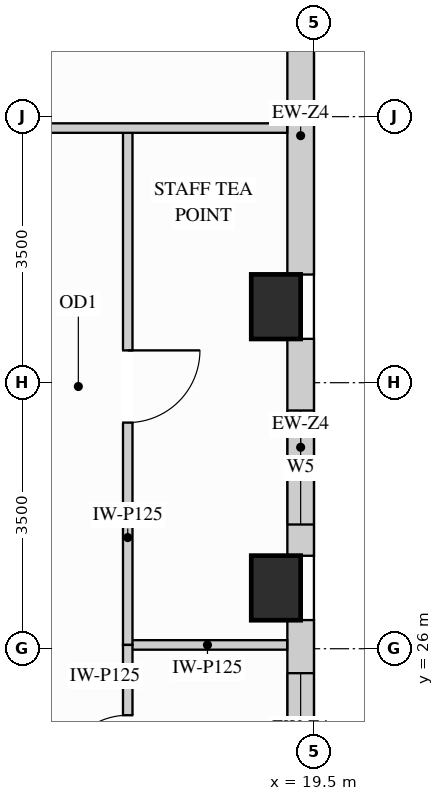
"""IFC4 building model, lengths in metres.
Left out: names, types, materials, properties, quantities, classifications, styles, units other than length and angle.
Written with IfcOpenShell. Run it as: python <this file> out.ifc"""

import sys

from ifc_helpers import new_model, si_unit, direction, frame, frame_2d, origin, origin_2d, place, context, subcontext, project, spatial, rectangle, extrude, source, transform, mapped, element, fill, save


model = new_model("IFC4")
c1 = context("Model", 3, precision=1e-05, world=origin(), true_north=direction((0.0, 1.0)))
c2 = subcontext(c1, "Body", "Model", "MODEL_VIEW")
j1 = project(units=[si_unit("LENGTHUNIT", "METRE"), si_unit("PLANEANGLEUNIT", "RADIAN")], contexts=[c1])
p1 = place(None, origin())
s1 = spatial("IfcSite", under=j1, at=p1, CompositionType="ELEMENT")
p2 = place(p1, origin())
s2 = spatial("IfcBuilding", under=s1, at=p2, CompositionType="ELEMENT")
p3 = place(p2, frame((0.0, 0.0, 252.0)))
s3 = spatial("IfcBuildingStorey", under=s2, at=p3, CompositionType="ELEMENT", Elevation=252.0)
m1 = source(origin(), c2, "Body", "SweptSolid", [
    extrude(rectangle(XDim=0.65, YDim=0.85, at=origin_2d()), origin(), (0.0, 0.0, 1.0), 3.4),
])
for number, where, z_axis, x_axis in (
    (1, (19.0, 26.8, 0.0), (0.0, 0.0, 1.0), (1.0, 0.0, 0.0)),
    (2, (19.0, 30.5, 0.0), (0.0, 0.0, 1.0), (1.0, 0.0, 0.0)),
):
    element("IfcColumn", number, at=place(p3, frame(where, z_axis=z_axis, x_axis=x_axis)), inside=s3, PredefinedType="COLUMN", context=c2, shape_type="MappedRepresentation", body=[
        mapped(m1, transform((0.0, 0.0, 0.0), x_axis=(1.0, 0.0, 0.0), y_axis=(0.0, 1.0, 0.0), z_axis=(0.0, 0.0, 1.0))),
    ])
p4 = place(p3, frame((19.325, 22.923, 0.0), z_axis=(0.0, 0.0, 1.0), x_axis=(0.0, 1.0, 0.0)))
e3 = element("IfcWall", 3, at=p4, inside=s3, PredefinedType="SOLIDWALL", context=c2, shape_type="SweptSolid", body=[
    extrude(rectangle(XDim=3.454, YDim=0.35, at=frame_2d((1.727, 0.0))), origin(), (0.0, 0.0, 1.0), 2.619),
])
p5 = place(p4, frame((1.256, 0.0, 0.78)))
e4 = element("IfcOpeningElement", 4, at=p5, cuts=e3, PredefinedType="OPENING", context=c2, shape_type="SweptSolid", body=[
    extrude(rectangle(XDim=1.5, YDim=1.659, at=frame_2d((0.75, 0.83))), frame((0.0, 0.185, 0.0), z_axis=(0.0, -1.0, 0.0), x_axis=(1.0, 0.0, 0.0)), (0.0, 0.0, 1.0), 0.37),
])
p6 = place(p3, frame((19.325, 27.223, 0.0), z_axis=(0.0, 0.0, 1.0), x_axis=(0.0, 1.0, 0.0)))
e5 = element("IfcWall", 5, at=p6, inside=s3, PredefinedType="SOLIDWALL", context=c2, shape_type="SweptSolid", body=[
    extrude(rectangle(XDim=2.854, YDim=0.35, at=frame_2d((1.427, 0.0))), origin(), (0.0, 0.0, 1.0), 2.619),
])
p7 = place(p6, frame((0.411, 0.0, 0.78)))
e6 = element("IfcOpeningElement", 6, at=p7, cuts=e5, PredefinedType="OPENING", context=c2, shape_type="SweptSolid", body=[
    extrude(rectangle(XDim=1.5, YDim=1.659, at=frame_2d((0.75, 0.83))), frame((0.0, 0.185, 0.0), z_axis=(0.0, -1.0, 0.0), x_axis=(1.0, 0.0, 0.0)), (0.0, 0.0, 1.0), 0.37),
])
m2 = source(origin(), c2, "Body", "SweptSolid", [
    extrude(rectangle(XDim=3.654, YDim=0.35, at=frame_2d((1.827, 0.0))), origin(), (0.0, 0.0, 1.0), 2.619),
])
p8 = place(p3, frame((19.325, 30.923, 0.0), z_axis=(0.0, 0.0, 1.0), x_axis=(0.0, 1.0, 0.0)))
e7 = element("IfcWall", 7, at=p8, inside=s3, PredefinedType="SOLIDWALL", context=c2, shape_type="MappedRepresentation", body=[
    mapped(m2, transform((0.0, 0.0, 0.0), x_axis=(1.0, 0.0, 0.0), y_axis=(0.0, 1.0, 0.0), z_axis=(0.0, 0.0, 1.0))),
])
m3 = source(origin(), c2, "Body", "SweptSolid", [
    extrude(rectangle(XDim=2.098, YDim=0.125, at=frame_2d((1.049, 0.0))), origin(), (0.0, 0.0, 1.0), 3.385),
])
p9 = place(p3, frame((17.05, 26.05, 0.0), z_axis=(0.0, 0.0, 1.0), x_axis=(1.0, 0.0, 0.0)))
e8 = element("IfcWall", 8, at=p9, inside=s3, PredefinedType="PARTITIONING", context=c2, shape_type="MappedRepresentation", body=[
    mapped(m3, transform((0.0, 0.0, 0.0), x_axis=(1.0, 0.0, 0.0), y_axis=(0.0, 1.0, 0.0), z_axis=(0.0, 0.0, 1.0))),
])
p10 = place(p3, frame((17.05, 26.05, 0.0), z_axis=(0.0, 0.0, 1.0), x_axis=(0.0, 1.0, 0.0)))
e9 = element("IfcWall", 9, at=p10, inside=s3, PredefinedType="PARTITIONING", context=c2, shape_type="SweptSolid", body=[
    extrude(rectangle(XDim=6.8, YDim=0.125, at=frame_2d((3.4, 0.0))), origin(), (0.0, 0.0, 1.0), 3.385),
])
p11 = place(p10, frame((2.925, 0.0, 0.0)))
e10 = element("IfcOpeningElement", 10, at=p11, cuts=e9, PredefinedType="OPENING", context=c2, shape_type="SweptSolid", body=[
    extrude(rectangle(XDim=0.95, YDim=2.15, at=frame_2d((0.475, 1.075))), frame((0.0, 0.073, 0.0), z_axis=(0.0, -1.0, 0.0), x_axis=(1.0, 0.0, 0.0)), (0.0, 0.0, 1.0), 0.145),
])
p12 = place(p3, frame((17.05, 23.35, 0.0), z_axis=(0.0, 0.0, 1.0), x_axis=(0.0, 1.0, 0.0)))
e11 = element("IfcWall", 11, at=p12, inside=s3, PredefinedType="PARTITIONING", context=c2, shape_type="SweptSolid", body=[
    extrude(rectangle(XDim=2.7, YDim=0.125, at=frame_2d((1.35, 0.0))), origin(), (0.0, 0.0, 1.0), 3.385),
])
p13 = place(p12, frame((0.875, 0.0, 0.0)))
e12 = element("IfcOpeningElement", 12, at=p13, cuts=e11, PredefinedType="OPENING", context=c2, shape_type="SweptSolid", body=[
    extrude(rectangle(XDim=0.9, YDim=2.15, at=frame_2d((0.45, 1.075))), frame((0.0, 0.073, 0.0), z_axis=(0.0, -1.0, 0.0), x_axis=(1.0, 0.0, 0.0)), (0.0, 0.0, 1.0), 0.145),
])
m4 = source(origin(), c2, "Body", "SweptSolid", [
    extrude(rectangle(XDim=12.598, YDim=0.125, at=frame_2d((6.299, 0.0))), origin(), (0.0, 0.0, 1.0), 3.385),
])
p14 = place(p3, frame((6.55, 32.85, 0.0), z_axis=(0.0, 0.0, 1.0), x_axis=(1.0, 0.0, 0.0)))
e13 = element("IfcWall", 13, at=p14, inside=s3, PredefinedType="PARTITIONING", context=c2, shape_type="MappedRepresentation", body=[
    mapped(m4, transform((0.0, 0.0, 0.0), x_axis=(1.0, 0.0, 0.0), y_axis=(0.0, 1.0, 0.0), z_axis=(0.0, 0.0, 1.0))),
])
m5 = source(origin(), c2, "Body", "SweptSolid", [
    extrude(rectangle(XDim=0.95, YDim=2.15, at=frame_2d((0.475, 1.075))), frame((0.0, 0.025, 0.0), z_axis=(0.0, -1.0, 0.0), x_axis=(1.0, 0.0, 0.0)), (0.0, 0.0, 1.0), 0.05),
])
p15 = place(p11, origin())
e14 = element("IfcDoor", 14, at=p15, inside=s3, OperationType="SINGLE_SWING_RIGHT", PredefinedType="DOOR", context=c2, shape_type="MappedRepresentation", body=[
    mapped(m5, transform((0.0, 0.0, 0.0), x_axis=(1.0, 0.0, 0.0), y_axis=(0.0, 1.0, 0.0), z_axis=(0.0, 0.0, 1.0))),
])
fill(e10, e14)
m6 = source(origin(), c2, "Body", "SweptSolid", [
    extrude(rectangle(XDim=0.9, YDim=2.15, at=frame_2d((0.45, 1.075))), frame((0.0, 0.025, 0.0), z_axis=(0.0, -1.0, 0.0), x_axis=(1.0, 0.0, 0.0)), (0.0, 0.0, 1.0), 0.05),
])
p16 = place(p13, origin())
e15 = element("IfcDoor", 15, at=p16, inside=s3, OperationType="SINGLE_SWING_LEFT", PredefinedType="DOOR", context=c2, shape_type="MappedRepresentation", body=[
    mapped(m6, transform((0.0, 0.0, 0.0), x_axis=(1.0, 0.0, 0.0), y_axis=(0.0, 1.0, 0.0), z_axis=(0.0, 0.0, 1.0))),
])
fill(e12, e15)
m7 = source(origin(), c2, "Body", "SweptSolid", [
    extrude(rectangle(XDim=1.5, YDim=1.659, at=frame_2d((0.75, 0.83))), frame((0.0, 0.03, 0.0), z_axis=(0.0, -1.0, 0.0), x_axis=(1.0, 0.0, 0.0)), (0.0, 0.0, 1.0), 0.06),
])
p17 = place(p5, origin())
e16 = element("IfcWindow", 16, at=p17, inside=s3, PartitioningType="SINGLE_PANEL", PredefinedType="WINDOW", context=c2, shape_type="MappedRepresentation", body=[
    mapped(m7, transform((0.0, 0.0, 0.0), x_axis=(1.0, 0.0, 0.0), y_axis=(0.0, 1.0, 0.0), z_axis=(0.0, 0.0, 1.0))),
])
fill(e4, e16)
p18 = place(p7, origin())
e17 = element("IfcWindow", 17, at=p18, inside=s3, PartitioningType="SINGLE_PANEL", PredefinedType="WINDOW", context=c2, shape_type="MappedRepresentation", body=[
    mapped(m7, transform((0.0, 0.0, 0.0), x_axis=(1.0, 0.0, 0.0), y_axis=(0.0, 1.0, 0.0), z_axis=(0.0, 0.0, 1.0))),
])
fill(e6, e17)
save(model, sys.argv[1])
